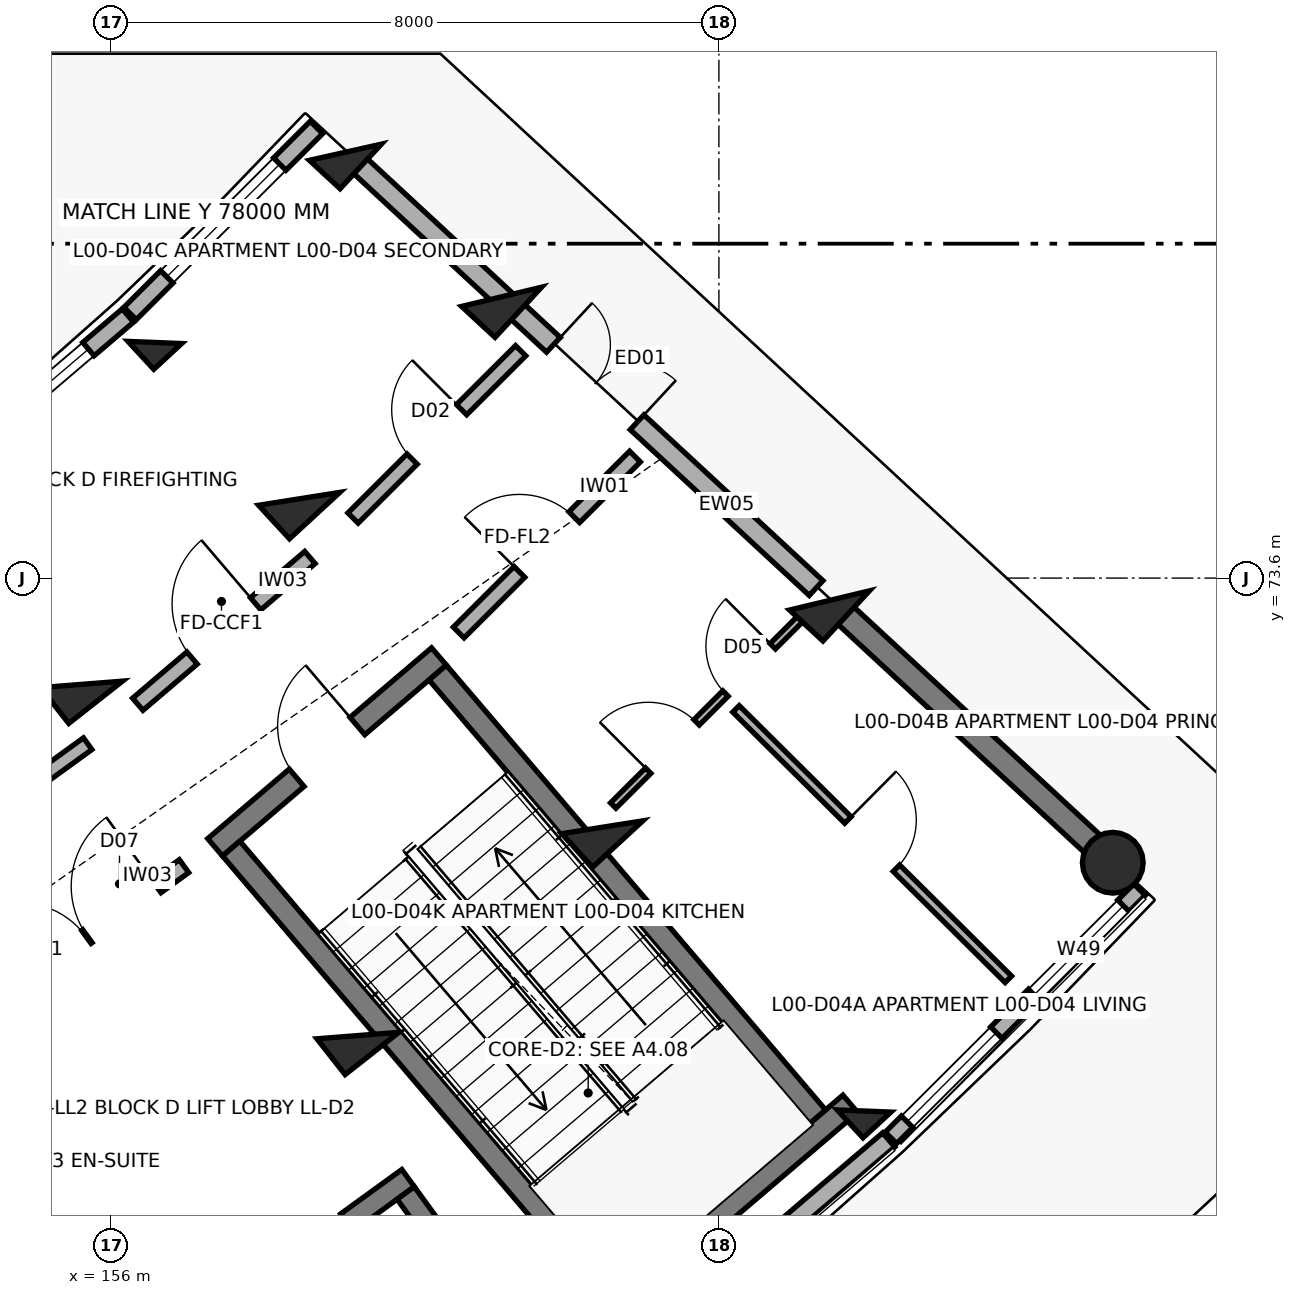
"""IFC4 building model, lengths in metres.
Left out: names, types, materials, properties, quantities, classifications, styles, units other than length and angle.
Written with IfcOpenShell. Run it as: python <this file> out.ifc"""

import sys

from ifc_helpers import new_model, si_unit, direction, frame, frame_2d, origin, origin_2d, place, context, subcontext, project, spatial, rectangle, circle, extrude, element, fill, save


model = new_model("IFC4")
c1 = context("Model", 3, precision=1e-05, world=origin(), true_north=direction((0.0, 1.0)))
c2 = subcontext(c1, "Body", "Model", "MODEL_VIEW")
j1 = project(units=[si_unit("LENGTHUNIT", "METRE"), si_unit("PLANEANGLEUNIT", "RADIAN")], contexts=[c1])
p1 = place(None, origin())
s1 = spatial("IfcSite", under=j1, at=p1, CompositionType="ELEMENT")
p2 = place(p1, origin())
s2 = spatial("IfcBuilding", under=s1, at=p2, CompositionType="ELEMENT")
p3 = place(p2, origin())
s3 = spatial("IfcBuildingStorey", under=s2, at=p3, CompositionType="ELEMENT", Elevation=0.0)
for number, where, z_axis, x_axis in (
    (1, (155.831, 65.101, 0.0), (0.0, 0.0, 1.0), (0.555, -0.832, 0.0)),
    (2, (155.614, 72.202, 0.0), (0.0, 0.0, 1.0), (0.618, -0.786, 0.0)),
    (3, (159.25, 67.581, 0.0), (0.0, 0.0, 1.0), (0.618, -0.786, 0.0)),
):
    element("IfcColumn", number, at=place(p3, frame(where, z_axis=z_axis, x_axis=x_axis)), inside=s3, PredefinedType="COLUMN", context=c2, shape_type="SweptSolid", body=[
        extrude(rectangle(XDim=0.6, YDim=0.9, at=origin_2d()), origin(), (0.0, 0.0, 1.0), 4.5),
    ])
p4 = place(p3, frame((156.579, 76.701, 0.0), z_axis=(0.0, 0.0, 1.0), x_axis=(0.678159669868, -0.73491459515, 0.0)))
e4 = element("IfcColumn", 4, at=p4, inside=s3, PredefinedType="COLUMN", context=c2, shape_type="SweptSolid", body=[
    extrude(rectangle(XDim=0.5, YDim=0.5, at=origin_2d()), origin(), (0.0, 0.0, 1.0), 4.5),
])
for number, where, z_axis, x_axis in (
    (5, (158.477, 74.643, 0.0), (0.0, 0.0, 1.0), (0.678, -0.735, 0.0)),
    (6, (162.465, 70.322, 0.0), (0.0, 0.0, 1.0), (0.678, -0.735, 0.0)),
):
    element("IfcColumn", number, at=place(p3, frame(where, z_axis=z_axis, x_axis=x_axis)), inside=s3, PredefinedType="COLUMN", context=c2, shape_type="SweptSolid", body=[
        extrude(rectangle(XDim=0.6, YDim=0.9, at=origin_2d()), origin(), (0.0, 0.0, 1.0), 4.5),
    ])
p5 = place(p3, frame((165.91, 66.588, 0.0), z_axis=(0.0, 0.0, 1.0), x_axis=(0.678159669868, -0.73491459515, 0.0)))
e7 = element("IfcColumn", 7, at=p5, inside=s3, PredefinedType="COLUMN", context=c2, shape_type="SweptSolid", body=[
    extrude(rectangle(XDim=0.5, YDim=0.5, at=origin_2d()), origin(), (0.0, 0.0, 1.0), 4.5),
])
p6 = place(p3, frame((159.086, 79.204, 0.0), z_axis=(0.0, 0.0, 1.0), x_axis=(0.733729864503, -0.679441304262, 0.0)))
e8 = element("IfcColumn", 8, at=p6, inside=s3, PredefinedType="COLUMN", context=c2, shape_type="SweptSolid", body=[
    extrude(rectangle(XDim=0.55, YDim=0.8, at=origin_2d()), origin(), (0.0, 0.0, 1.0), 4.5),
])
for number, where, z_axis, x_axis in (
    (9, (161.14, 77.301, 0.0), (0.0, 0.0, 1.0), (0.734, -0.679, 0.0)),
    (10, (165.455, 73.306, 0.0), (0.0, 0.0, 1.0), (0.734, -0.679, 0.0)),
):
    element("IfcColumn", number, at=place(p3, frame(where, z_axis=z_axis, x_axis=x_axis)), inside=s3, PredefinedType="COLUMN", context=c2, shape_type="SweptSolid", body=[
        extrude(rectangle(XDim=0.6, YDim=0.9, at=origin_2d()), origin(), (0.0, 0.0, 1.0), 4.5),
    ])
p7 = place(p3, frame((169.182, 69.854, 0.0), z_axis=(0.0, 0.0, 1.0), x_axis=(0.733729864503, -0.679441304262, 0.0)))
e11 = element("IfcColumn", 11, at=p7, inside=s3, PredefinedType="COLUMN", context=c2, shape_type="SweptSolid", body=[
    extrude(circle(Radius=0.4, at=origin_2d()), origin(), (0.0, 0.0, 1.0), 4.5),
])
p8 = place(p3, frame((165.587, 73.184, 0.0), z_axis=(0.0, 0.0, 1.0), x_axis=(0.733739663667, -0.679430721974, 0.0)))
e12 = element("IfcWall", 12, at=p8, inside=s3, PredefinedType="SHEAR", context=c2, shape_type="SweptSolid", body=[
    extrude(rectangle(XDim=4.72, YDim=0.31, at=frame_2d((2.36, 0.0))), origin(), (0.0, 0.0, 1.0), 4.26),
])
p9 = place(p3, frame((162.716, 63.209, 0.0), z_axis=(0.0, 0.0, 1.0), x_axis=(0.760968923704, 0.64878833001, 0.0)))
e13 = element("IfcWall", 13, at=p9, inside=s3, PredefinedType="SOLIDWALL", context=c2, shape_type="SweptSolid", body=[
    extrude(rectangle(XDim=4.623, YDim=0.245, at=frame_2d((2.311, 0.0))), origin(), (0.0, 0.0, 1.0), 3.45),
])
p10 = place(p3, frame((153.589, 74.808, 0.0), z_axis=(0.0, 0.0, 1.0), x_axis=(0.760985425115, 0.648768974876, 0.0)))
e14 = element("IfcWall", 14, at=p10, inside=s3, PredefinedType="SOLIDWALL", context=c2, shape_type="SweptSolid", body=[
    extrude(rectangle(XDim=3.464, YDim=0.23, at=frame_2d((1.732, 0.0))), origin(), (0.0, 0.0, 1.0), 3.45),
])
p11 = place(p10, frame((0.682, 0.0, 0.32)))
e15 = element("IfcOpeningElement", 15, at=p11, cuts=e14, PredefinedType="OPENING", context=c2, shape_type="SweptSolid", body=[
    extrude(rectangle(XDim=2.1, YDim=1.65, at=frame_2d((1.05, 0.825))), frame((0.0, 0.125, 0.0), z_axis=(0.0, -1.0, 0.0), x_axis=(1.0, 0.0, 0.0)), (0.0, 0.0, 1.0), 0.25),
])
p12 = place(p3, frame((166.263, 66.235, 0.0), z_axis=(0.0, 0.0, 1.0), x_axis=(0.707713886734, 0.706499153944, 0.0)))
e16 = element("IfcWall", 16, at=p12, inside=s3, PredefinedType="SOLIDWALL", context=c2, shape_type="SweptSolid", body=[
    extrude(rectangle(XDim=4.623, YDim=0.212, at=frame_2d((2.311, 0.0))), origin(), (0.0, 0.0, 1.0), 3.45),
])
p13 = place(p12, frame((0.3, 0.0, 0.3)))
e17 = element("IfcOpeningElement", 17, at=p13, cuts=e16, PredefinedType="OPENING", context=c2, shape_type="SweptSolid", body=[
    extrude(rectangle(XDim=1.66, YDim=1.16, at=frame_2d((0.83, 0.58))), frame((0.0, 0.116, 0.0), z_axis=(0.0, -1.0, 0.0), x_axis=(1.0, 0.0, 0.0)), (0.0, 0.0, 1.0), 0.232),
])
p14 = place(p12, frame((2.663, 0.0, 0.3)))
e18 = element("IfcOpeningElement", 18, at=p14, cuts=e16, PredefinedType="OPENING", context=c2, shape_type="SweptSolid", body=[
    extrude(rectangle(XDim=1.66, YDim=1.16, at=frame_2d((0.83, 0.58))), frame((0.0, 0.116, 0.0), z_axis=(0.0, -1.0, 0.0), x_axis=(1.0, 0.0, 0.0)), (0.0, 0.0, 1.0), 0.232),
])
p15 = place(p3, frame((156.254, 77.082, 0.0), z_axis=(0.0, 0.0, 1.0), x_axis=(0.707705680562, 0.70650737413, 0.0)))
e19 = element("IfcWall", 19, at=p15, inside=s3, PredefinedType="SOLIDWALL", context=c2, shape_type="SweptSolid", body=[
    extrude(rectangle(XDim=3.464, YDim=0.23, at=frame_2d((1.732, 0.0))), origin(), (0.0, 0.0, 1.0), 3.45),
])
p16 = place(p15, frame((0.682, 0.0, 0.32)))
e20 = element("IfcOpeningElement", 20, at=p16, cuts=e19, PredefinedType="OPENING", context=c2, shape_type="SweptSolid", body=[
    extrude(rectangle(XDim=2.1, YDim=1.65, at=frame_2d((1.05, 0.825))), frame((0.0, 0.125, 0.0), z_axis=(0.0, -1.0, 0.0), x_axis=(1.0, 0.0, 0.0)), (0.0, 0.0, 1.0), 0.25),
])
p17 = place(p3, frame((159.262, 79.041, 0.0), z_axis=(0.0, 0.0, 1.0), x_axis=(0.733738684326, -0.679431779595, 0.0)))
e21 = element("IfcWall", 21, at=p17, inside=s3, PredefinedType="SOLIDWALL", context=c2, shape_type="SweptSolid", body=[
    extrude(rectangle(XDim=8.2, YDim=0.265, at=frame_2d((4.1, 0.0))), origin(), (0.0, 0.0, 1.0), 3.34),
])
p18 = place(p17, frame((3.49, 0.0, 0.0)))
e22 = element("IfcOpeningElement", 22, at=p18, cuts=e21, PredefinedType="OPENING", context=c2, shape_type="SweptSolid", body=[
    extrude(rectangle(XDim=1.5, YDim=2.2, at=frame_2d((0.75, 1.1))), frame((0.0, 0.142, 0.0), z_axis=(0.0, -1.0, 0.0), x_axis=(1.0, 0.0, 0.0)), (0.0, 0.0, 1.0), 0.285),
])
p19 = place(p3, frame((157.372, 70.058, 0.0), z_axis=(0.0, 0.0, 1.0), x_axis=(0.760990583254, 0.648762924495, 0.0)))
e23 = element("IfcWall", 23, at=p19, inside=s3, PredefinedType="SHEAR", context=c2, shape_type="SweptSolid", body=[
    extrude(rectangle(XDim=3.87, YDim=0.3, at=frame_2d((1.935, 0.0))), origin(), (0.0, 0.0, 1.0), 4.5),
])
p20 = place(p19, frame((1.41, 0.0, 0.0)))
e24 = element("IfcOpeningElement", 24, at=p20, cuts=e23, PredefinedType="OPENING", context=c2, shape_type="SweptSolid", body=[
    extrude(rectangle(XDim=1.05, YDim=2.15, at=frame_2d((0.525, 1.075))), frame((0.0, 0.16, 0.0), z_axis=(0.0, -1.0, 0.0), x_axis=(1.0, 0.0, 0.0)), (0.0, 0.0, 1.0), 0.32),
])
p21 = place(p3, frame((162.327, 63.783, 0.0), z_axis=(0.0, 0.0, 1.0), x_axis=(0.760969560012, 0.648787583678, 0.0)))
e25 = element("IfcWall", 25, at=p21, inside=s3, PredefinedType="SHEAR", context=c2, shape_type="SweptSolid", body=[
    extrude(rectangle(XDim=4.47, YDim=0.3, at=frame_2d((2.235, 0.0))), origin(), (0.0, 0.0, 1.0), 4.5),
])
p22 = place(p3, frame((157.583, 70.041, 0.0), z_axis=(0.0, 0.0, 1.0), x_axis=(0.648762810187, -0.760990680704, 0.0)))
e26 = element("IfcWall", 26, at=p22, inside=s3, PredefinedType="SHEAR", context=c2, shape_type="SweptSolid", body=[
    extrude(rectangle(XDim=7.69, YDim=0.3, at=frame_2d((3.845, 0.0))), origin(), (0.0, 0.0, 1.0), 4.5),
])
p23 = place(p3, frame((160.3, 72.357, 0.0), z_axis=(0.0, 0.0, 1.0), x_axis=(0.648781194888, -0.760975006922, 0.0)))
e27 = element("IfcWall", 27, at=p23, inside=s3, PredefinedType="SHEAR", context=c2, shape_type="SweptSolid", body=[
    extrude(rectangle(XDim=7.69, YDim=0.3, at=frame_2d((3.845, 0.0))), origin(), (0.0, 0.0, 1.0), 4.5),
])
p24 = place(p3, frame((157.409, 63.89, 0.0), z_axis=(0.0, 0.0, 1.0), x_axis=(0.809510936031, 0.587104798521, 0.0)))
e28 = element("IfcWall", 28, at=p24, inside=s3, PredefinedType="SHEAR", context=c2, shape_type="SweptSolid", body=[
    extrude(rectangle(XDim=3.09, YDim=0.28, at=frame_2d((1.545, 0.0))), origin(), (0.0, 0.0, 1.0), 4.5),
])
p25 = place(p24, frame((0.995, 0.0, 0.0)))
e29 = element("IfcOpeningElement", 29, at=p25, cuts=e28, PredefinedType="OPENING", context=c2, shape_type="SweptSolid", body=[
    extrude(rectangle(XDim=1.1, YDim=2.15, at=frame_2d((0.55, 1.075))), frame((0.0, 0.15, 0.0), z_axis=(0.0, -1.0, 0.0), x_axis=(1.0, 0.0, 0.0)), (0.0, 0.0, 1.0), 0.3),
])
p26 = place(p3, frame((159.879, 65.509, 0.0), z_axis=(0.0, 0.0, 1.0), x_axis=(0.58704837408, -0.809551855344, 0.0)))
e30 = element("IfcWall", 30, at=p26, inside=s3, PredefinedType="SHEAR", context=c2, shape_type="SweptSolid", body=[
    extrude(rectangle(XDim=2.03, YDim=0.28, at=frame_2d((1.015, 0.0))), origin(), (0.0, 0.0, 1.0), 4.5),
])
p27 = place(p3, frame((154.423, 67.968, 0.0), z_axis=(0.0, 0.0, 1.0), x_axis=(0.809516127005, 0.587097641043, 0.0)))
e31 = element("IfcWall", 31, at=p27, inside=s3, PredefinedType="SOLIDWALL", context=c2, shape_type="SweptSolid", body=[
    extrude(rectangle(XDim=3.137, YDim=0.21, at=frame_2d((1.569, 0.0))), origin(), (0.0, 0.0, 1.0), 3.34),
])
p28 = place(p27, frame((0.45, 0.0, 0.0)))
e32 = element("IfcOpeningElement", 32, at=p28, cuts=e31, PredefinedType="OPENING", context=c2, shape_type="SweptSolid", body=[
    extrude(rectangle(XDim=1.1, YDim=2.15, at=frame_2d((0.55, 1.075))), frame((0.0, 0.115, 0.0), z_axis=(0.0, -1.0, 0.0), x_axis=(1.0, 0.0, 0.0)), (0.0, 0.0, 1.0), 0.23),
])
p29 = place(p27, frame((1.567, 0.0, 0.0)))
e33 = element("IfcOpeningElement", 33, at=p29, cuts=e31, PredefinedType="OPENING", context=c2, shape_type="SweptSolid", body=[
    extrude(rectangle(XDim=1.12, YDim=2.15, at=frame_2d((0.56, 1.075))), frame((0.0, 0.115, 0.0), z_axis=(0.0, -1.0, 0.0), x_axis=(1.0, 0.0, 0.0)), (0.0, 0.0, 1.0), 0.23),
])
p30 = place(p3, frame((153.285, 69.674, 0.0), z_axis=(0.0, 0.0, 1.0), x_axis=(0.809505174959, 0.587112741911, 0.0)))
e34 = element("IfcWall", 34, at=p30, inside=s3, PredefinedType="SOLIDWALL", context=c2, shape_type="SweptSolid", body=[
    extrude(rectangle(XDim=2.976, YDim=0.19, at=frame_2d((1.488, 0.0))), origin(), (0.0, 0.0, 1.0), 3.34),
])
p31 = place(p30, frame((0.928, 0.0, 0.0)))
e35 = element("IfcOpeningElement", 35, at=p31, cuts=e34, PredefinedType="OPENING", context=c2, shape_type="SweptSolid", body=[
    extrude(rectangle(XDim=1.12, YDim=2.15, at=frame_2d((0.56, 1.075))), frame((0.0, 0.105, 0.0), z_axis=(0.0, -1.0, 0.0), x_axis=(1.0, 0.0, 0.0)), (0.0, 0.0, 1.0), 0.21),
])
p32 = place(p3, frame((156.354, 71.94, 0.0), z_axis=(0.0, 0.0, 1.0), x_axis=(0.760991187621, 0.648762215579, 0.0)))
e36 = element("IfcWall", 36, at=p32, inside=s3, PredefinedType="SOLIDWALL", context=c2, shape_type="SweptSolid", body=[
    extrude(rectangle(XDim=2.976, YDim=0.21, at=frame_2d((1.488, 0.0))), origin(), (0.0, 0.0, 1.0), 3.34),
])
p33 = place(p32, frame((0.938, 0.0, 0.0)))
e37 = element("IfcOpeningElement", 37, at=p33, cuts=e36, PredefinedType="OPENING", context=c2, shape_type="SweptSolid", body=[
    extrude(rectangle(XDim=1.1, YDim=2.15, at=frame_2d((0.55, 1.075))), frame((0.0, 0.115, 0.0), z_axis=(0.0, -1.0, 0.0), x_axis=(1.0, 0.0, 0.0)), (0.0, 0.0, 1.0), 0.23),
])
p34 = place(p3, frame((160.576, 72.884, 0.0), z_axis=(0.0, 0.0, 1.0), x_axis=(0.70773973846, 0.706473256822, 0.0)))
e38 = element("IfcWall", 38, at=p34, inside=s3, PredefinedType="SOLIDWALL", context=c2, shape_type="SweptSolid", body=[
    extrude(rectangle(XDim=3.277, YDim=0.2, at=frame_2d((1.639, 0.0))), origin(), (0.0, 0.0, 1.0), 3.34),
])
p35 = place(p34, frame((1.128, 0.0, 0.0)))
e39 = element("IfcOpeningElement", 39, at=p35, cuts=e38, PredefinedType="OPENING", context=c2, shape_type="SweptSolid", body=[
    extrude(rectangle(XDim=1.02, YDim=2.15, at=frame_2d((0.51, 1.075))), frame((0.0, 0.11, 0.0), z_axis=(0.0, -1.0, 0.0), x_axis=(1.0, 0.0, 0.0)), (0.0, 0.0, 1.0), 0.22),
])
p36 = place(p3, frame((159.186, 74.39, 0.0), z_axis=(0.0, 0.0, 1.0), x_axis=(0.70773330139, 0.706479705373, 0.0)))
e40 = element("IfcWall", 40, at=p36, inside=s3, PredefinedType="SOLIDWALL", context=c2, shape_type="SweptSolid", body=[
    extrude(rectangle(XDim=3.116, YDim=0.19, at=frame_2d((1.558, 0.0))), origin(), (0.0, 0.0, 1.0), 3.34),
])
p37 = place(p36, frame((1.098, 0.0, 0.0)))
e41 = element("IfcOpeningElement", 41, at=p37, cuts=e40, PredefinedType="OPENING", context=c2, shape_type="SweptSolid", body=[
    extrude(rectangle(XDim=0.92, YDim=2.1, at=frame_2d((0.46, 1.05))), frame((0.0, 0.105, 0.0), z_axis=(0.0, -1.0, 0.0), x_axis=(1.0, 0.0, 0.0)), (0.0, 0.0, 1.0), 0.21),
])
p38 = place(p3, frame((162.609, 70.607, 0.0), z_axis=(0.0, 0.0, 1.0), x_axis=(0.707714058013, 0.70649898237, 0.0)))
e42 = element("IfcWall", 42, at=p38, inside=s3, PredefinedType="PARTITIONING", context=c2, shape_type="SweptSolid", body=[
    extrude(rectangle(XDim=3.617, YDim=0.1, at=frame_2d((1.808, 0.0))), origin(), (0.0, 0.0, 1.0), 3.34),
])
p39 = place(p38, frame((0.65, 0.0, 0.0)))
e43 = element("IfcOpeningElement", 43, at=p39, cuts=e42, PredefinedType="OPENING", context=c2, shape_type="SweptSolid", body=[
    extrude(rectangle(XDim=0.9, YDim=2.1, at=frame_2d((0.45, 1.05))), frame((0.0, 0.06, 0.0), z_axis=(0.0, -1.0, 0.0), x_axis=(1.0, 0.0, 0.0)), (0.0, 0.0, 1.0), 0.12),
])
p40 = place(p38, frame((2.086, 0.0, 0.0)))
e44 = element("IfcOpeningElement", 44, at=p40, cuts=e42, PredefinedType="OPENING", context=c2, shape_type="SweptSolid", body=[
    extrude(rectangle(XDim=0.88, YDim=2.1, at=frame_2d((0.44, 1.05))), frame((0.0, 0.06, 0.0), z_axis=(0.0, -1.0, 0.0), x_axis=(1.0, 0.0, 0.0)), (0.0, 0.0, 1.0), 0.12),
])
p41 = place(p3, frame((164.225, 71.879, 0.0), z_axis=(0.0, 0.0, 1.0), x_axis=(0.709543935341, -0.704661197897, 0.0)))
e45 = element("IfcWall", 45, at=p41, inside=s3, PredefinedType="PARTITIONING", context=c2, shape_type="SweptSolid", body=[
    extrude(rectangle(XDim=5.05, YDim=0.12, at=frame_2d((2.525, 0.0))), origin(), (0.0, 0.0, 1.0), 3.34),
])
p42 = place(p41, frame((2.075, 0.0, 0.0)))
e46 = element("IfcOpeningElement", 46, at=p42, cuts=e45, PredefinedType="OPENING", context=c2, shape_type="SweptSolid", body=[
    extrude(rectangle(XDim=0.9, YDim=2.1, at=frame_2d((0.45, 1.05))), frame((0.0, 0.07, 0.0), z_axis=(0.0, -1.0, 0.0), x_axis=(1.0, 0.0, 0.0)), (0.0, 0.0, 1.0), 0.14),
])
p43 = place(p11, origin())
e47 = element("IfcWindow", 47, at=p43, inside=s3, PartitioningType="TRIPLE_PANEL_VERTICAL", PredefinedType="WINDOW", context=c2, shape_type="SweptSolid", body=[
    extrude(rectangle(XDim=2.1, YDim=1.65, at=frame_2d((1.05, 0.825))), frame((0.0, 0.03, 0.0), z_axis=(0.0, -1.0, 0.0), x_axis=(1.0, 0.0, 0.0)), (0.0, 0.0, 1.0), 0.06),
])
fill(e15, e47)
p44 = place(p13, origin())
e48 = element("IfcWindow", 48, at=p44, inside=s3, PartitioningType="DOUBLE_PANEL_VERTICAL", PredefinedType="WINDOW", context=c2, shape_type="SweptSolid", body=[
    extrude(rectangle(XDim=1.66, YDim=1.16, at=frame_2d((0.83, 0.58))), frame((0.0, 0.03, 0.0), z_axis=(0.0, -1.0, 0.0), x_axis=(1.0, 0.0, 0.0)), (0.0, 0.0, 1.0), 0.06),
])
fill(e17, e48)
p45 = place(p14, origin())
e49 = element("IfcWindow", 49, at=p45, inside=s3, PartitioningType="DOUBLE_PANEL_VERTICAL", PredefinedType="WINDOW", context=c2, shape_type="SweptSolid", body=[
    extrude(rectangle(XDim=1.66, YDim=1.16, at=frame_2d((0.83, 0.58))), frame((0.0, 0.03, 0.0), z_axis=(0.0, -1.0, 0.0), x_axis=(1.0, 0.0, 0.0)), (0.0, 0.0, 1.0), 0.06),
])
fill(e18, e49)
p46 = place(p16, origin())
e50 = element("IfcWindow", 50, at=p46, inside=s3, PartitioningType="TRIPLE_PANEL_VERTICAL", PredefinedType="WINDOW", context=c2, shape_type="SweptSolid", body=[
    extrude(rectangle(XDim=2.1, YDim=1.65, at=frame_2d((1.05, 0.825))), frame((0.0, 0.03, 0.0), z_axis=(0.0, -1.0, 0.0), x_axis=(1.0, 0.0, 0.0)), (0.0, 0.0, 1.0), 0.06),
])
fill(e20, e50)
p47 = place(p18, origin())
e51 = element("IfcDoor", 51, at=p47, inside=s3, OperationType="DOUBLE_DOOR_SINGLE_SWING", PredefinedType="DOOR", context=c2, shape_type="SweptSolid", body=[
    extrude(rectangle(XDim=1.5, YDim=2.2, at=frame_2d((0.75, 1.1))), frame((0.0, 0.025, 0.0), z_axis=(0.0, -1.0, 0.0), x_axis=(1.0, 0.0, 0.0)), (0.0, 0.0, 1.0), 0.05),
])
fill(e22, e51)
p48 = place(p20, origin())
e52 = element("IfcDoor", 52, at=p48, inside=s3, OperationType="SINGLE_SWING_RIGHT", PredefinedType="DOOR", context=c2, shape_type="SweptSolid", body=[
    extrude(rectangle(XDim=1.05, YDim=2.15, at=frame_2d((0.525, 1.075))), frame((0.0, 0.025, 0.0), z_axis=(0.0, -1.0, 0.0), x_axis=(1.0, 0.0, 0.0)), (0.0, 0.0, 1.0), 0.05),
])
fill(e24, e52)
p49 = place(p28, origin())
e53 = element("IfcDoor", 53, at=p49, inside=s3, OperationType="SINGLE_SWING_LEFT", PredefinedType="DOOR", context=c2, shape_type="SweptSolid", body=[
    extrude(rectangle(XDim=1.1, YDim=2.15, at=frame_2d((0.55, 1.075))), frame((0.0, 0.025, 0.0), z_axis=(0.0, -1.0, 0.0), x_axis=(1.0, 0.0, 0.0)), (0.0, 0.0, 1.0), 0.05),
])
fill(e32, e53)
p50 = place(p29, origin())
e54 = element("IfcDoor", 54, at=p50, inside=s3, OperationType="SINGLE_SWING_RIGHT", PredefinedType="DOOR", context=c2, shape_type="SweptSolid", body=[
    extrude(rectangle(XDim=1.12, YDim=2.15, at=frame_2d((0.56, 1.075))), frame((0.0, 0.025, 0.0), z_axis=(0.0, -1.0, 0.0), x_axis=(1.0, 0.0, 0.0)), (0.0, 0.0, 1.0), 0.05),
])
fill(e33, e54)
p51 = place(p33, origin())
e55 = element("IfcDoor", 55, at=p51, inside=s3, OperationType="SINGLE_SWING_RIGHT", PredefinedType="DOOR", context=c2, shape_type="SweptSolid", body=[
    extrude(rectangle(XDim=1.1, YDim=2.15, at=frame_2d((0.55, 1.075))), frame((0.0, 0.025, 0.0), z_axis=(0.0, -1.0, 0.0), x_axis=(1.0, 0.0, 0.0)), (0.0, 0.0, 1.0), 0.05),
])
fill(e37, e55)
p52 = place(p35, origin())
e56 = element("IfcDoor", 56, at=p52, inside=s3, OperationType="SINGLE_SWING_LEFT", PredefinedType="DOOR", context=c2, shape_type="SweptSolid", body=[
    extrude(rectangle(XDim=1.02, YDim=2.15, at=frame_2d((0.51, 1.075))), frame((0.0, 0.025, 0.0), z_axis=(0.0, -1.0, 0.0), x_axis=(1.0, 0.0, 0.0)), (0.0, 0.0, 1.0), 0.05),
])
fill(e39, e56)
p53 = place(p37, origin())
e57 = element("IfcDoor", 57, at=p53, inside=s3, OperationType="SINGLE_SWING_RIGHT", PredefinedType="DOOR", context=c2, shape_type="SweptSolid", body=[
    extrude(rectangle(XDim=0.92, YDim=2.1, at=frame_2d((0.46, 1.05))), frame((0.0, 0.025, 0.0), z_axis=(0.0, -1.0, 0.0), x_axis=(1.0, 0.0, 0.0)), (0.0, 0.0, 1.0), 0.05),
])
fill(e41, e57)
p54 = place(p39, origin())
e58 = element("IfcDoor", 58, at=p54, inside=s3, OperationType="SINGLE_SWING_LEFT", PredefinedType="DOOR", context=c2, shape_type="SweptSolid", body=[
    extrude(rectangle(XDim=0.9, YDim=2.1, at=frame_2d((0.45, 1.05))), frame((0.0, 0.025, 0.0), z_axis=(0.0, -1.0, 0.0), x_axis=(1.0, 0.0, 0.0)), (0.0, 0.0, 1.0), 0.05),
])
fill(e43, e58)
p55 = place(p40, origin())
e59 = element("IfcDoor", 59, at=p55, inside=s3, OperationType="SINGLE_SWING_RIGHT", PredefinedType="DOOR", context=c2, shape_type="SweptSolid", body=[
    extrude(rectangle(XDim=0.88, YDim=2.1, at=frame_2d((0.44, 1.05))), frame((0.0, 0.025, 0.0), z_axis=(0.0, -1.0, 0.0), x_axis=(1.0, 0.0, 0.0)), (0.0, 0.0, 1.0), 0.05),
])
fill(e44, e59)
p56 = place(p42, origin())
e60 = element("IfcDoor", 60, at=p56, inside=s3, OperationType="SINGLE_SWING_LEFT", PredefinedType="DOOR", context=c2, shape_type="SweptSolid", body=[
    extrude(rectangle(XDim=0.9, YDim=2.1, at=frame_2d((0.45, 1.05))), frame((0.0, 0.025, 0.0), z_axis=(0.0, -1.0, 0.0), x_axis=(1.0, 0.0, 0.0)), (0.0, 0.0, 1.0), 0.05),
])
fill(e46, e60)
save(model, sys.argv[1])
